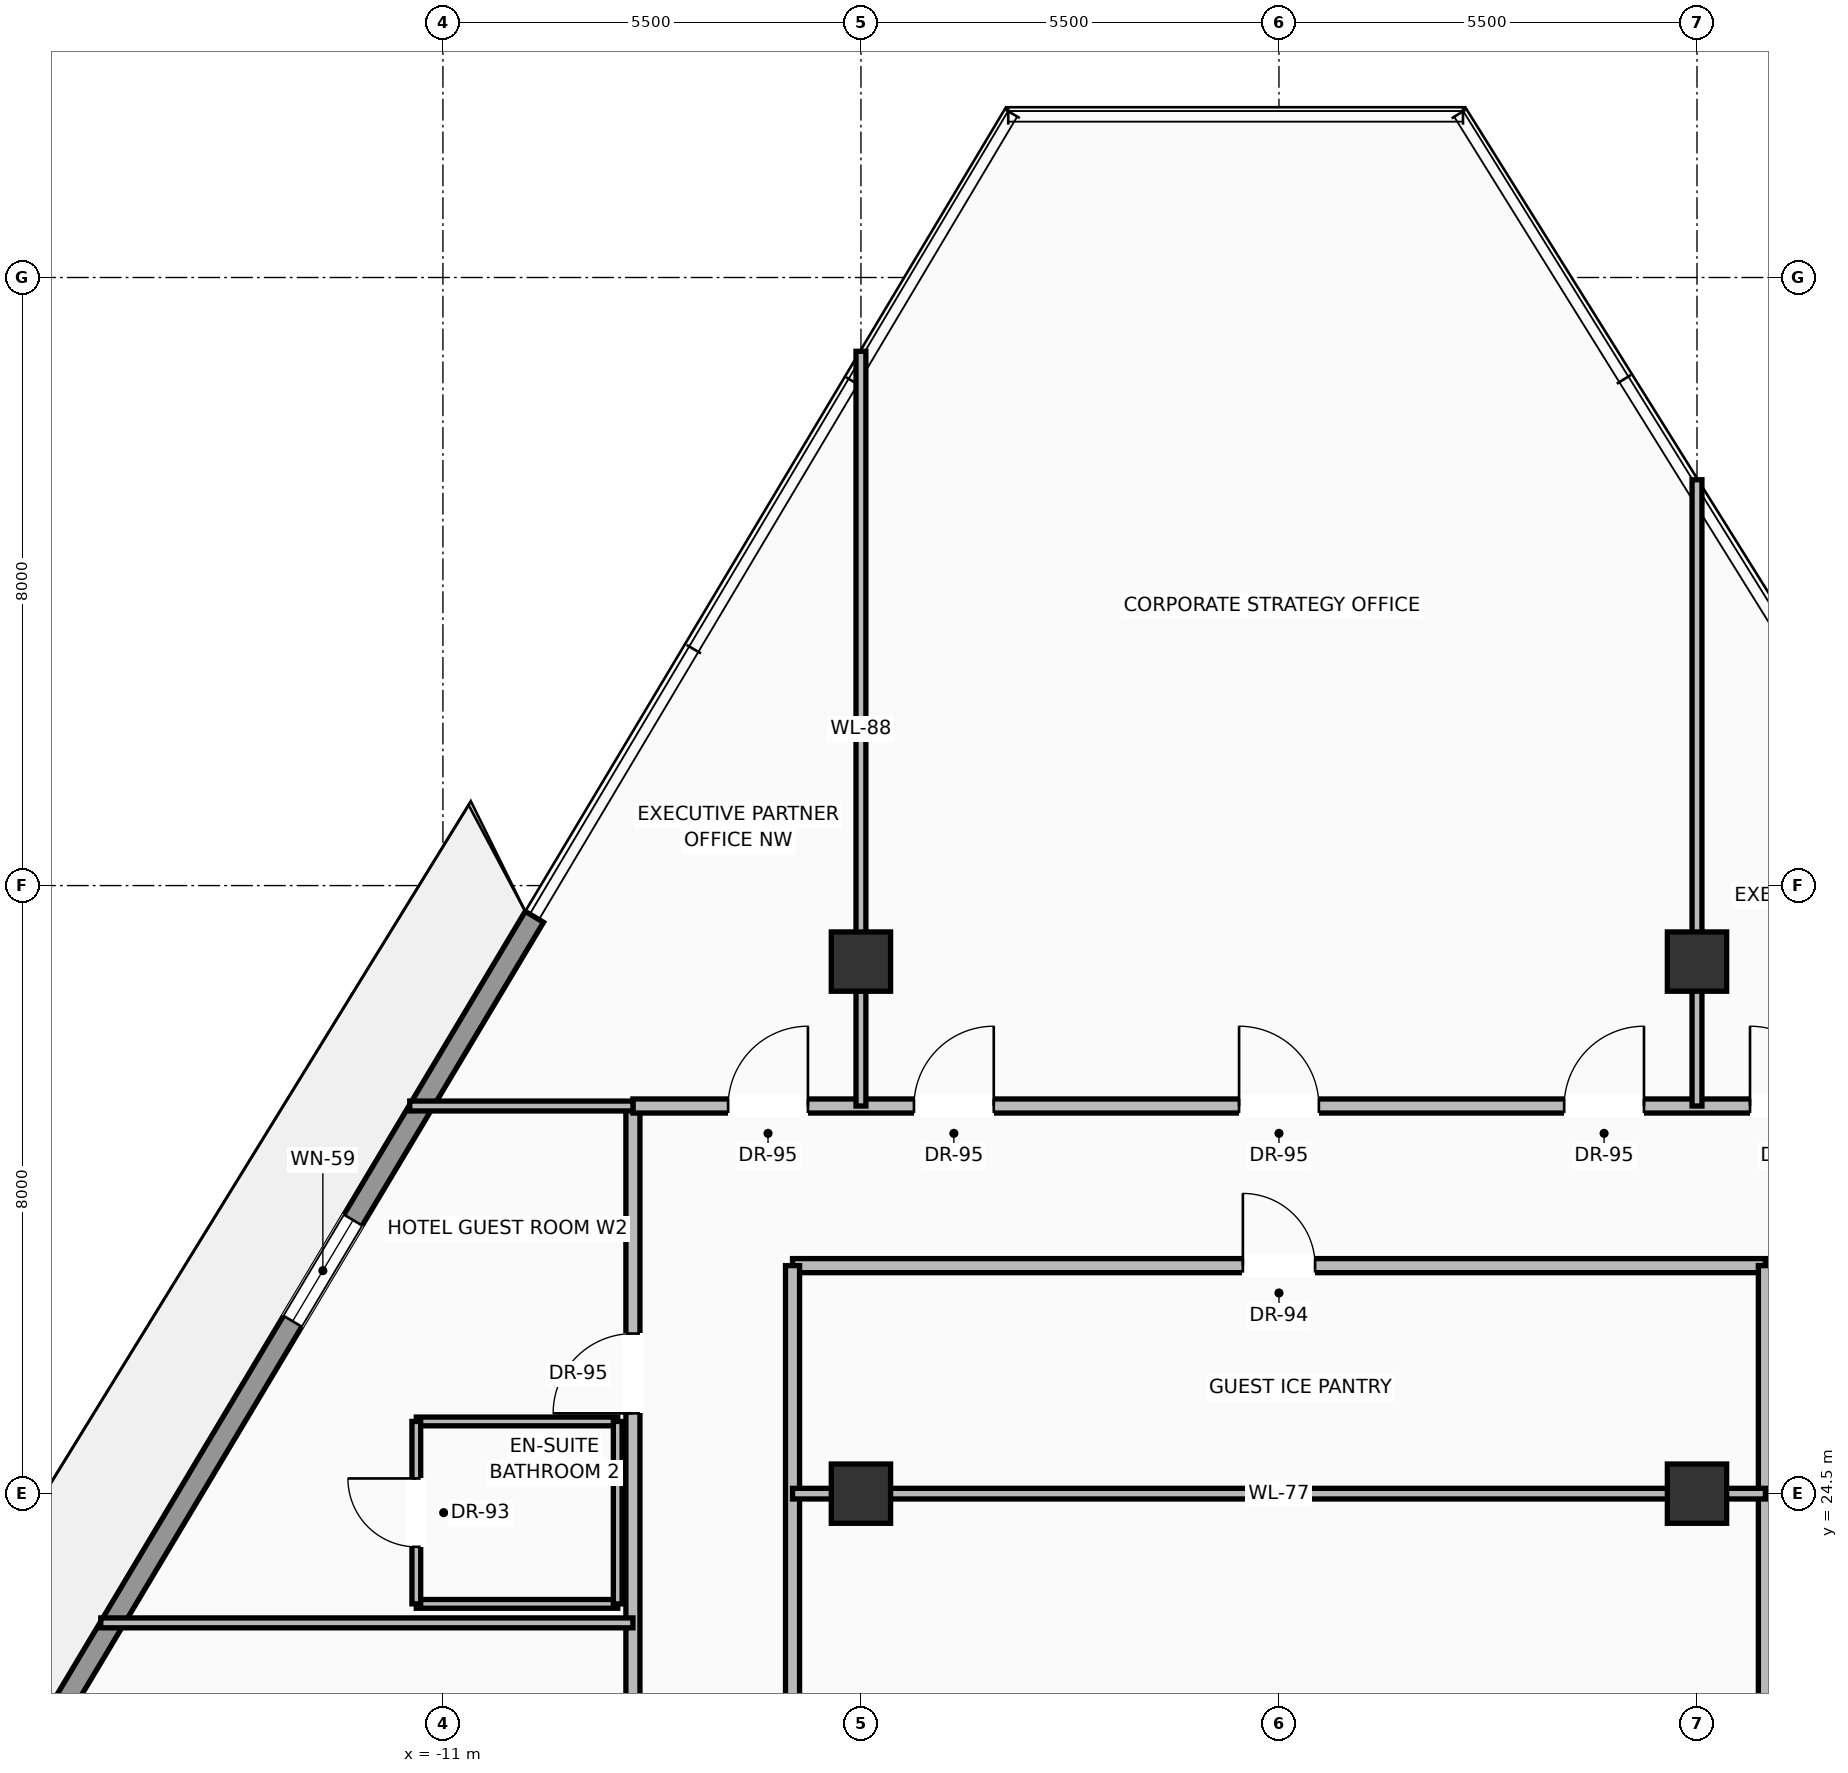
"""IFC4 building model, lengths in metres.
Left out: names, types, materials, properties, quantities, classifications, styles, units other than length and angle.
Written with IfcOpenShell. Run it as: python <this file> out.ifc"""

import sys

from ifc_helpers import new_model, si_unit, direction, frame, frame_2d, origin, origin_2d, place, context, subcontext, project, spatial, rectangle, extrude, source, transform, mapped, element, fill, save


model = new_model("IFC4")
c1 = context("Model", 3, precision=1e-05, world=origin(), true_north=direction((0.0, 1.0)))
c2 = subcontext(c1, "Body", "Model", "MODEL_VIEW")
j1 = project(units=[si_unit("LENGTHUNIT", "METRE"), si_unit("PLANEANGLEUNIT", "RADIAN")], contexts=[c1])
p1 = place(None, origin())
s1 = spatial("IfcSite", under=j1, at=p1, CompositionType="ELEMENT")
p2 = place(p1, origin())
s2 = spatial("IfcBuilding", under=s1, at=p2, CompositionType="ELEMENT")
p3 = place(p2, frame((0.0, 0.0, 223.45)))
s3 = spatial("IfcBuildingStorey", under=s2, at=p3, CompositionType="ELEMENT", Elevation=223.45)
m1 = source(origin(), c2, "Body", "SweptSolid", [
    extrude(rectangle(XDim=0.78, YDim=0.78, at=origin_2d()), origin(), (0.0, 0.0, 1.0), 3.45),
])
for number, where, z_axis, x_axis in (
    (1, (-5.5, 24.5, 0.0), (0.0, 0.0, 1.0), (1.0, 0.0, 0.0)),
    (2, (5.5, 24.5, 0.0), (0.0, 0.0, 1.0), (1.0, 0.0, 0.0)),
    (3, (-5.5, 31.5, 0.0), (0.0, 0.0, 1.0), (1.0, 0.0, 0.0)),
    (4, (5.5, 31.5, 0.0), (0.0, 0.0, 1.0), (1.0, 0.0, 0.0)),
):
    element("IfcColumn", number, at=place(p3, frame(where, z_axis=z_axis, x_axis=x_axis)), inside=s3, PredefinedType="COLUMN", context=c2, shape_type="MappedRepresentation", body=[
        mapped(m1, transform((0.0, 0.0, 0.0), scale=1.0)),
    ])
p4 = place(p3, frame((-19.736, 15.464, 0.0), z_axis=(0.0, 0.0, 1.0), x_axis=(0.513136432844, 0.858307055364, 0.0)))
e5 = element("IfcWall", 5, at=p4, inside=s3, PredefinedType="SOLIDWALL", context=c2, shape_type="SweptSolid", body=[
    extrude(rectangle(XDim=19.37, YDim=0.28, at=frame_2d((9.685, 0.0))), origin(), (0.0, 0.0, 1.0), 2.82),
])
p5 = place(p4, frame((4.649, 0.0, 0.0)))
e6 = element("IfcOpeningElement", 6, at=p5, cuts=e5, PredefinedType="OPENING", context=c2, shape_type="SweptSolid", body=[
    extrude(rectangle(XDim=1.6, YDim=2.35, at=frame_2d((0.8, 1.175))), frame((0.0, 0.15, 0.0), z_axis=(0.0, -1.0, 0.0), x_axis=(1.0, 0.0, 0.0)), (0.0, 0.0, 1.0), 0.3),
])
p6 = place(p4, frame((13.171, 0.0, 0.9)))
e7 = element("IfcOpeningElement", 7, at=p6, cuts=e5, PredefinedType="OPENING", context=c2, shape_type="SweptSolid", body=[
    extrude(rectangle(XDim=1.55, YDim=1.75, at=frame_2d((0.775, 0.875))), frame((0.0, 0.15, 0.0), z_axis=(0.0, -1.0, 0.0), x_axis=(1.0, 0.0, 0.0)), (0.0, 0.0, 1.0), 0.3),
])
p7 = place(p3, frame((-6.4, 27.5, 0.0), z_axis=(0.0, 0.0, 1.0), x_axis=(1.0, 0.0, 0.0)))
e8 = element("IfcWall", 8, at=p7, inside=s3, PredefinedType="PARTITIONING", context=c2, shape_type="SweptSolid", body=[
    extrude(rectangle(XDim=12.8, YDim=0.185, at=frame_2d((6.4, 0.0))), origin(), (0.0, 0.0, 1.0), 3.232),
])
p8 = place(p7, frame((5.925, 0.0, 0.0)))
e9 = element("IfcOpeningElement", 9, at=p8, cuts=e8, PredefinedType="OPENING", context=c2, shape_type="SweptSolid", body=[
    extrude(rectangle(XDim=0.95, YDim=2.2, at=frame_2d((0.475, 1.1))), frame((0.0, 0.103, 0.0), z_axis=(0.0, -1.0, 0.0), x_axis=(1.0, 0.0, 0.0)), (0.0, 0.0, 1.0), 0.205),
])
for number, where, z_axis, x_axis in (
    (10, (-6.4, 18.4, 0.0), (0.0, 0.0, 1.0), (0.0, 1.0, 0.0)),
    (11, (6.4, 18.4, 0.0), (0.0, 0.0, 1.0), (0.0, 1.0, 0.0)),
):
    element("IfcWall", number, at=place(p3, frame(where, z_axis=z_axis, x_axis=x_axis)), inside=s3, PredefinedType="PARTITIONING", context=c2, shape_type="SweptSolid", body=[
        extrude(rectangle(XDim=9.1, YDim=0.185, at=frame_2d((4.55, 0.0))), origin(), (0.0, 0.0, 1.0), 3.232),
    ])
p9 = place(p3, frame((-8.5, 16.3, 0.0), z_axis=(0.0, 0.0, 1.0), x_axis=(0.0, 1.0, 0.0)))
e12 = element("IfcWall", 12, at=p9, inside=s3, PredefinedType="PARTITIONING", context=c2, shape_type="SweptSolid", body=[
    extrude(rectangle(XDim=13.3, YDim=0.185, at=frame_2d((6.65, 0.0))), origin(), (0.0, 0.0, 1.0), 3.232),
])
p10 = place(p9, frame((3.136, 0.0, 0.0)))
e13 = element("IfcOpeningElement", 13, at=p10, cuts=e12, PredefinedType="OPENING", context=c2, shape_type="SweptSolid", body=[
    extrude(rectangle(XDim=1.05, YDim=2.25, at=frame_2d((0.525, 1.125))), frame((0.0, 0.103, 0.0), z_axis=(0.0, -1.0, 0.0), x_axis=(1.0, 0.0, 0.0)), (0.0, 0.0, 1.0), 0.205),
])
p11 = place(p9, frame((9.256, 0.0, 0.0)))
e14 = element("IfcOpeningElement", 14, at=p11, cuts=e12, PredefinedType="OPENING", context=c2, shape_type="SweptSolid", body=[
    extrude(rectangle(XDim=1.05, YDim=2.25, at=frame_2d((0.525, 1.125))), frame((0.0, 0.103, 0.0), z_axis=(0.0, -1.0, 0.0), x_axis=(1.0, 0.0, 0.0)), (0.0, 0.0, 1.0), 0.205),
])
p12 = place(p3, frame((-8.5, 29.6, 0.0), z_axis=(0.0, 0.0, 1.0), x_axis=(1.0, 0.0, 0.0)))
e15 = element("IfcWall", 15, at=p12, inside=s3, PredefinedType="PARTITIONING", context=c2, shape_type="SweptSolid", body=[
    extrude(rectangle(XDim=17.0, YDim=0.185, at=frame_2d((8.5, 0.0))), origin(), (0.0, 0.0, 1.0), 3.232),
])
p13 = place(p12, frame((3.698, 0.0, 0.0)))
e16 = element("IfcOpeningElement", 16, at=p13, cuts=e15, PredefinedType="OPENING", context=c2, shape_type="SweptSolid", body=[
    extrude(rectangle(XDim=1.05, YDim=2.25, at=frame_2d((0.525, 1.125))), frame((0.0, 0.103, 0.0), z_axis=(0.0, -1.0, 0.0), x_axis=(1.0, 0.0, 0.0)), (0.0, 0.0, 1.0), 0.205),
])
p14 = place(p12, frame((7.975, 0.0, 0.0)))
e17 = element("IfcOpeningElement", 17, at=p14, cuts=e15, PredefinedType="OPENING", context=c2, shape_type="SweptSolid", body=[
    extrude(rectangle(XDim=1.05, YDim=2.25, at=frame_2d((0.525, 1.125))), frame((0.0, 0.103, 0.0), z_axis=(0.0, -1.0, 0.0), x_axis=(1.0, 0.0, 0.0)), (0.0, 0.0, 1.0), 0.205),
])
p15 = place(p12, frame((12.252, 0.0, 0.0)))
e18 = element("IfcOpeningElement", 18, at=p15, cuts=e15, PredefinedType="OPENING", context=c2, shape_type="SweptSolid", body=[
    extrude(rectangle(XDim=1.05, YDim=2.25, at=frame_2d((0.525, 1.125))), frame((0.0, 0.103, 0.0), z_axis=(0.0, -1.0, 0.0), x_axis=(1.0, 0.0, 0.0)), (0.0, 0.0, 1.0), 0.205),
])
p16 = place(p12, frame((14.698, 0.0, 0.0)))
e19 = element("IfcOpeningElement", 19, at=p16, cuts=e15, PredefinedType="OPENING", context=c2, shape_type="SweptSolid", body=[
    extrude(rectangle(XDim=1.05, YDim=2.25, at=frame_2d((0.525, 1.125))), frame((0.0, 0.103, 0.0), z_axis=(0.0, -1.0, 0.0), x_axis=(1.0, 0.0, 0.0)), (0.0, 0.0, 1.0), 0.205),
])
p17 = place(p12, frame((1.252, 0.0, 0.0)))
e20 = element("IfcOpeningElement", 20, at=p17, cuts=e15, PredefinedType="OPENING", context=c2, shape_type="SweptSolid", body=[
    extrude(rectangle(XDim=1.05, YDim=2.25, at=frame_2d((0.525, 1.125))), frame((0.0, 0.103, 0.0), z_axis=(0.0, -1.0, 0.0), x_axis=(1.0, 0.0, 0.0)), (0.0, 0.0, 1.0), 0.205),
])
p18 = place(p3, frame((-6.4, 24.5, 0.0), z_axis=(0.0, 0.0, 1.0), x_axis=(1.0, 0.0, 0.0)))
e21 = element("IfcWall", 21, at=p18, inside=s3, PredefinedType="PARTITIONING", context=c2, shape_type="SweptSolid", body=[
    extrude(rectangle(XDim=12.8, YDim=0.14, at=frame_2d((6.4, 0.0))), origin(), (0.0, 0.0, 1.0), 2.683),
])
p19 = place(p3, frame((-11.436, 29.6, 0.0), z_axis=(0.0, 0.0, 1.0), x_axis=(1.0, 0.0, 0.0)))
e22 = element("IfcWall", 22, at=p19, inside=s3, PredefinedType="PARTITIONING", context=c2, shape_type="SweptSolid", body=[
    extrude(rectangle(XDim=2.936, YDim=0.13, at=frame_2d((1.468, 0.0))), origin(), (0.0, 0.0, 1.0), 3.232),
])
p20 = place(p3, frame((-5.5, 29.6, 0.0), z_axis=(0.0, 0.0, 1.0), x_axis=(0.0, 1.0, 0.0)))
e23 = element("IfcWall", 23, at=p20, inside=s3, PredefinedType="PARTITIONING", context=c2, shape_type="SweptSolid", body=[
    extrude(rectangle(XDim=9.929, YDim=0.13, at=frame_2d((4.965, 0.0))), origin(), (0.0, 0.0, 1.0), 2.683),
])
p21 = place(p3, frame((5.5, 29.6, 0.0), z_axis=(0.0, 0.0, 1.0), x_axis=(0.0, 1.0, 0.0)))
e24 = element("IfcWall", 24, at=p21, inside=s3, PredefinedType="PARTITIONING", context=c2, shape_type="SweptSolid", body=[
    extrude(rectangle(XDim=8.239, YDim=0.13, at=frame_2d((4.12, 0.0))), origin(), (0.0, 0.0, 1.0), 2.683),
])
p22 = place(p3, frame((-15.501, 22.8, 0.0), z_axis=(0.0, 0.0, 1.0), x_axis=(1.0, 0.0, 0.0)))
e25 = element("IfcWall", 25, at=p22, inside=s3, PredefinedType="PARTITIONING", context=c2, shape_type="SweptSolid", body=[
    extrude(rectangle(XDim=7.001, YDim=0.13, at=frame_2d((3.501, 0.0))), origin(), (0.0, 0.0, 1.0), 3.232),
])
for number, where, z_axis, x_axis in (
    (26, (-11.35, 23.05, 0.0), (0.0, 0.0, 1.0), (1.0, 0.0, 0.0)),
    (27, (-11.35, 25.45, 0.0), (0.0, 0.0, 1.0), (1.0, 0.0, 0.0)),
):
    element("IfcWall", number, at=place(p3, frame(where, z_axis=z_axis, x_axis=x_axis)), inside=s3, PredefinedType="PARTITIONING", context=c2, shape_type="SweptSolid", body=[
        extrude(rectangle(XDim=2.65, YDim=0.115, at=frame_2d((1.325, 0.0))), origin(), (0.0, 0.0, 1.0), 3.232),
    ])
p23 = place(p3, frame((-11.35, 23.05, 0.0), z_axis=(0.0, 0.0, 1.0), x_axis=(0.0, 1.0, 0.0)))
e28 = element("IfcWall", 28, at=p23, inside=s3, PredefinedType="PARTITIONING", context=c2, shape_type="SweptSolid", body=[
    extrude(rectangle(XDim=2.4, YDim=0.115, at=frame_2d((1.2, 0.0))), origin(), (0.0, 0.0, 1.0), 3.232),
])
p24 = place(p23, frame((0.75, 0.0, 0.0)))
e29 = element("IfcOpeningElement", 29, at=p24, cuts=e28, PredefinedType="OPENING", context=c2, shape_type="SweptSolid", body=[
    extrude(rectangle(XDim=0.9, YDim=2.15, at=frame_2d((0.45, 1.075))), frame((0.0, 0.067, 0.0), z_axis=(0.0, -1.0, 0.0), x_axis=(1.0, 0.0, 0.0)), (0.0, 0.0, 1.0), 0.135),
])
p25 = place(p3, frame((-8.7, 23.05, 0.0), z_axis=(0.0, 0.0, 1.0), x_axis=(0.0, 1.0, 0.0)))
e30 = element("IfcWall", 30, at=p25, inside=s3, PredefinedType="PARTITIONING", context=c2, shape_type="SweptSolid", body=[
    extrude(rectangle(XDim=2.4, YDim=0.115, at=frame_2d((1.2, 0.0))), origin(), (0.0, 0.0, 1.0), 3.232),
])
m2 = source(origin(), c2, "Body", "SweptSolid", [
    extrude(rectangle(XDim=1.55, YDim=1.75, at=frame_2d((0.775, 0.875))), frame((0.0, 0.03, 0.0), z_axis=(0.0, -1.0, 0.0), x_axis=(1.0, 0.0, 0.0)), (0.0, 0.0, 1.0), 0.06),
])
p26 = place(p6, origin())
e31 = element("IfcWindow", 31, at=p26, inside=s3, PartitioningType="SINGLE_PANEL", PredefinedType="WINDOW", context=c2, shape_type="MappedRepresentation", body=[
    mapped(m2, transform((0.0, 0.0, 0.0), scale=1.0)),
])
fill(e7, e31)
m3 = source(origin(), c2, "Body", "SweptSolid", [
    extrude(rectangle(XDim=0.95, YDim=2.2, at=frame_2d((0.475, 1.1))), frame((0.0, 0.025, 0.0), z_axis=(0.0, -1.0, 0.0), x_axis=(1.0, 0.0, 0.0)), (0.0, 0.0, 1.0), 0.05),
])
p27 = place(p8, origin())
e32 = element("IfcDoor", 32, at=p27, inside=s3, OperationType="SINGLE_SWING_LEFT", PredefinedType="DOOR", context=c2, shape_type="MappedRepresentation", body=[
    mapped(m3, transform((0.0, 0.0, 0.0), scale=1.0)),
])
fill(e9, e32)
m4 = source(origin(), c2, "Body", "SweptSolid", [
    extrude(rectangle(XDim=1.05, YDim=2.25, at=frame_2d((0.525, 1.125))), frame((0.0, 0.025, 0.0), z_axis=(0.0, -1.0, 0.0), x_axis=(1.0, 0.0, 0.0)), (0.0, 0.0, 1.0), 0.05),
])
p28 = place(p11, origin())
e33 = element("IfcDoor", 33, at=p28, inside=s3, OperationType="SINGLE_SWING_LEFT", PredefinedType="DOOR", context=c2, shape_type="MappedRepresentation", body=[
    mapped(m4, transform((0.0, 0.0, 0.0), scale=1.0)),
])
fill(e14, e33)
m5 = source(origin(), c2, "Body", "SweptSolid", [
    extrude(rectangle(XDim=0.9, YDim=2.15, at=frame_2d((0.45, 1.075))), frame((0.0, 0.025, 0.0), z_axis=(0.0, -1.0, 0.0), x_axis=(1.0, 0.0, 0.0)), (0.0, 0.0, 1.0), 0.05),
])
p29 = place(p24, origin())
e34 = element("IfcDoor", 34, at=p29, inside=s3, OperationType="SINGLE_SWING_RIGHT", PredefinedType="DOOR", context=c2, shape_type="MappedRepresentation", body=[
    mapped(m5, transform((0.0, 0.0, 0.0), scale=1.0)),
])
fill(e29, e34)
p30 = place(p13, origin())
e35 = element("IfcDoor", 35, at=p30, inside=s3, OperationType="SINGLE_SWING_RIGHT", PredefinedType="DOOR", context=c2, shape_type="MappedRepresentation", body=[
    mapped(m4, transform((0.0, 0.0, 0.0), scale=1.0)),
])
fill(e16, e35)
p31 = place(p14, origin())
e36 = element("IfcDoor", 36, at=p31, inside=s3, OperationType="SINGLE_SWING_LEFT", PredefinedType="DOOR", context=c2, shape_type="MappedRepresentation", body=[
    mapped(m4, transform((0.0, 0.0, 0.0), scale=1.0)),
])
fill(e17, e36)
p32 = place(p15, origin())
e37 = element("IfcDoor", 37, at=p32, inside=s3, OperationType="SINGLE_SWING_RIGHT", PredefinedType="DOOR", context=c2, shape_type="MappedRepresentation", body=[
    mapped(m4, transform((0.0, 0.0, 0.0), scale=1.0)),
])
fill(e18, e37)
p33 = place(p16, origin())
e38 = element("IfcDoor", 38, at=p33, inside=s3, OperationType="SINGLE_SWING_LEFT", PredefinedType="DOOR", context=c2, shape_type="MappedRepresentation", body=[
    mapped(m4, transform((0.0, 0.0, 0.0), scale=1.0)),
])
fill(e19, e38)
p34 = place(p17, origin())
e39 = element("IfcDoor", 39, at=p34, inside=s3, OperationType="SINGLE_SWING_RIGHT", PredefinedType="DOOR", context=c2, shape_type="MappedRepresentation", body=[
    mapped(m4, transform((0.0, 0.0, 0.0), scale=1.0)),
])
fill(e20, e39)
save(model, sys.argv[1])
